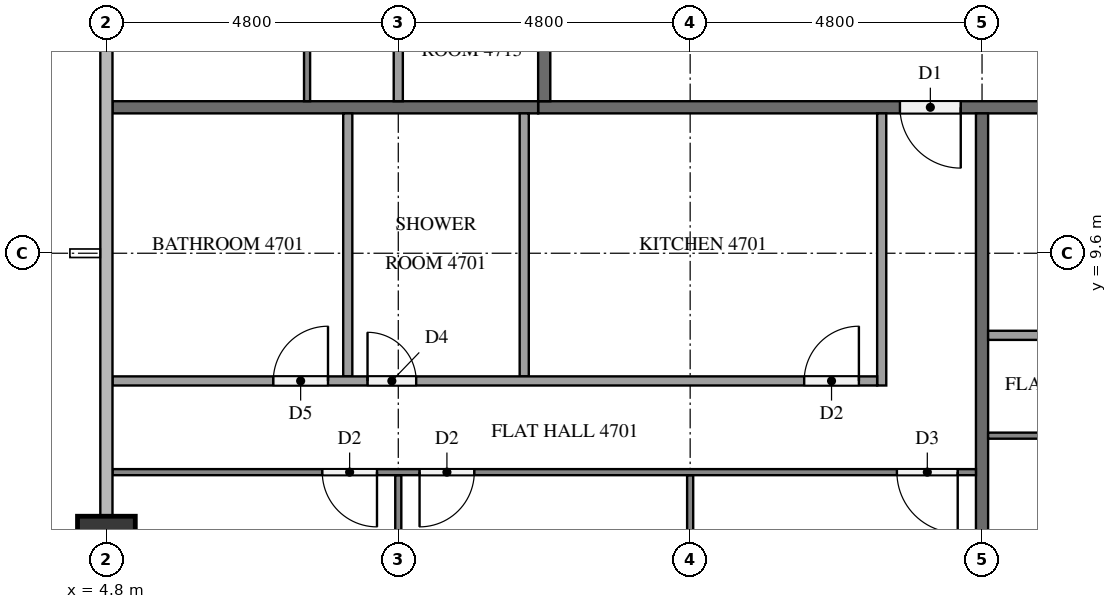
"""IFC4 building model, lengths in metres.
Left out: names, types, materials, properties, quantities, classifications, styles, units other than length and angle.
Written with IfcOpenShell. Run it as: python <this file> out.ifc"""

import sys

from ifc_helpers import new_model, si_unit, direction, frame, frame_2d, origin, origin_2d, place, context, subcontext, project, spatial, rectangle, extrude, element, fill, save


model = new_model("IFC4")
c1 = context("Model", 3, precision=1e-05, world=origin(), true_north=direction((0.0, 1.0)))
c2 = subcontext(c1, "Body", "Model", "MODEL_VIEW")
j1 = project(units=[si_unit("LENGTHUNIT", "METRE"), si_unit("PLANEANGLEUNIT", "RADIAN")], contexts=[c1])
p1 = place(None, origin())
s1 = spatial("IfcSite", under=j1, at=p1, CompositionType="ELEMENT")
p2 = place(p1, origin())
s2 = spatial("IfcBuilding", under=s1, at=p2, CompositionType="ELEMENT")
p3 = place(p2, frame((0.0, 0.0, 182.4)))
s3 = spatial("IfcBuildingStorey", under=s2, at=p3, CompositionType="ELEMENT", Elevation=182.4)
p4 = place(p3, frame((4.8, 4.8, 0.0), z_axis=(0.0, 0.0, 1.0), x_axis=(1.0, 0.0, 0.0)))
e1 = element("IfcColumn", 1, at=p4, inside=s3, PredefinedType="COLUMN", context=c2, shape_type="SweptSolid", body=[
    extrude(rectangle(XDim=0.95, YDim=0.95, at=origin_2d()), origin(), (0.0, 0.0, 1.0), 3.2),
])
p5 = place(p3, frame((50.5, 12.0, 0.0), z_axis=(0.0, 0.0, 1.0), x_axis=(-1.0, 0.0, 0.0)))
e2 = element("IfcWall", 2, at=p5, inside=s3, PredefinedType="PARTITIONING", context=c2, shape_type="SweptSolid", body=[
    extrude(rectangle(XDim=38.6, YDim=0.2, at=frame_2d((19.3, 0.0))), origin(), (0.0, 0.0, 1.0), 3.2),
])
p6 = place(p5, frame((31.65, 0.0, 0.0)))
e3 = element("IfcOpeningElement", 3, at=p6, cuts=e2, PredefinedType="OPENING", context=c2, shape_type="SweptSolid", body=[
    extrude(rectangle(XDim=1.0, YDim=2.1, at=frame_2d((0.5, 1.05))), frame((0.0, 0.11, 0.0), z_axis=(0.0, -1.0, 0.0), x_axis=(1.0, 0.0, 0.0)), (0.0, 0.0, 1.0), 0.22),
])
p7 = place(p5, frame((17.25, 0.0, 0.0)))
e4 = element("IfcOpeningElement", 4, at=p7, cuts=e2, PredefinedType="OPENING", context=c2, shape_type="SweptSolid", body=[
    extrude(rectangle(XDim=1.0, YDim=2.1, at=frame_2d((0.5, 1.05))), frame((0.0, 0.11, 0.0), z_axis=(0.0, -1.0, 0.0), x_axis=(1.0, 0.0, 0.0)), (0.0, 0.0, 1.0), 0.22),
])
p8 = place(p5, frame((7.65, 0.0, 0.0)))
e5 = element("IfcOpeningElement", 5, at=p8, cuts=e2, PredefinedType="OPENING", context=c2, shape_type="SweptSolid", body=[
    extrude(rectangle(XDim=1.0, YDim=2.1, at=frame_2d((0.5, 1.05))), frame((0.0, 0.11, 0.0), z_axis=(0.0, -1.0, 0.0), x_axis=(1.0, 0.0, 0.0)), (0.0, 0.0, 1.0), 0.22),
])
p9 = place(p5, frame((5.9, 0.0, 0.0)))
e6 = element("IfcOpeningElement", 6, at=p9, cuts=e2, PredefinedType="OPENING", context=c2, shape_type="SweptSolid", body=[
    extrude(rectangle(XDim=1.1, YDim=2.1, at=frame_2d((0.55, 1.05))), frame((0.0, 0.11, 0.0), z_axis=(0.0, -1.0, 0.0), x_axis=(1.0, 0.0, 0.0)), (0.0, 0.0, 1.0), 0.22),
])
p10 = place(p3, frame((12.0, 12.1, 0.0), z_axis=(0.0, 0.0, 1.0), x_axis=(0.0, 1.0, 0.0)))
e7 = element("IfcWall", 7, at=p10, inside=s3, PredefinedType="PARTITIONING", context=c2, shape_type="SweptSolid", body=[
    extrude(rectangle(XDim=28.6, YDim=0.2, at=frame_2d((14.3, 0.0))), origin(), (0.0, 0.0, 1.0), 3.2),
])
p11 = place(p10, frame((26.65, 0.0, 0.0)))
e8 = element("IfcOpeningElement", 8, at=p11, cuts=e7, PredefinedType="OPENING", context=c2, shape_type="SweptSolid", body=[
    extrude(rectangle(XDim=1.0, YDim=2.1, at=frame_2d((0.5, 1.05))), frame((0.0, 0.11, 0.0), z_axis=(0.0, -1.0, 0.0), x_axis=(1.0, 0.0, 0.0)), (0.0, 0.0, 1.0), 0.22),
])
p12 = place(p10, frame((24.95, 0.0, 0.0)))
e9 = element("IfcOpeningElement", 9, at=p12, cuts=e7, PredefinedType="OPENING", context=c2, shape_type="SweptSolid", body=[
    extrude(rectangle(XDim=1.0, YDim=2.1, at=frame_2d((0.5, 1.05))), frame((0.0, 0.11, 0.0), z_axis=(0.0, -1.0, 0.0), x_axis=(1.0, 0.0, 0.0)), (0.0, 0.0, 1.0), 0.22),
])
p13 = place(p10, frame((12.95, 0.0, 0.0)))
e10 = element("IfcOpeningElement", 10, at=p13, cuts=e7, PredefinedType="OPENING", context=c2, shape_type="SweptSolid", body=[
    extrude(rectangle(XDim=1.0, YDim=2.1, at=frame_2d((0.5, 1.05))), frame((0.0, 0.11, 0.0), z_axis=(0.0, -1.0, 0.0), x_axis=(1.0, 0.0, 0.0)), (0.0, 0.0, 1.0), 0.22),
])
p14 = place(p3, frame((19.2, 11.9, 0.0), z_axis=(0.0, 0.0, 1.0), x_axis=(0.0, -1.0, 0.0)))
e11 = element("IfcWall", 11, at=p14, inside=s3, PredefinedType="PARTITIONING", context=c2, shape_type="SweptSolid", body=[
    extrude(rectangle(XDim=11.575, YDim=0.2, at=frame_2d((5.788, 0.0))), origin(), (0.0, 0.0, 1.0), 3.2),
])
p15 = place(p3, frame((4.9, 12.0, 0.0), z_axis=(0.0, 0.0, 1.0), x_axis=(1.0, 0.0, 0.0)))
e12 = element("IfcWall", 12, at=p15, inside=s3, PredefinedType="PARTITIONING", context=c2, shape_type="SweptSolid", body=[
    extrude(rectangle(XDim=7.0, YDim=0.2, at=frame_2d((3.5, 0.0))), origin(), (0.0, 0.0, 1.0), 3.2),
])
p16 = place(p3, frame((14.4, 5.95, 0.0), z_axis=(0.0, 0.0, 1.0), x_axis=(0.0, -1.0, 0.0)))
e13 = element("IfcWall", 13, at=p16, inside=s3, PredefinedType="PARTITIONING", context=c2, shape_type="SweptSolid", body=[
    extrude(rectangle(XDim=5.85, YDim=0.1, at=frame_2d((2.925, 0.0))), origin(), (0.0, 0.0, 1.0), 3.2),
])
p17 = place(p3, frame((9.6, 5.95, 0.0), z_axis=(0.0, 0.0, 1.0), x_axis=(0.0, -1.0, 0.0)))
e14 = element("IfcWall", 14, at=p17, inside=s3, PredefinedType="PARTITIONING", context=c2, shape_type="SweptSolid", body=[
    extrude(rectangle(XDim=5.475, YDim=0.1, at=frame_2d((2.737, 0.0))), origin(), (0.0, 0.0, 1.0), 3.2),
])
p18 = place(p3, frame((19.1, 6.0, 0.0), z_axis=(0.0, 0.0, 1.0), x_axis=(-1.0, 0.0, 0.0)))
e15 = element("IfcWall", 15, at=p18, inside=s3, PredefinedType="PARTITIONING", context=c2, shape_type="SweptSolid", body=[
    extrude(rectangle(XDim=14.2, YDim=0.1, at=frame_2d((7.1, 0.0))), origin(), (0.0, 0.0, 1.0), 3.2),
])
p19 = place(p18, frame((0.3, 0.0, 0.0)))
e16 = element("IfcOpeningElement", 16, at=p19, cuts=e15, PredefinedType="OPENING", context=c2, shape_type="SweptSolid", body=[
    extrude(rectangle(XDim=1.0, YDim=2.1, at=frame_2d((0.5, 1.05))), frame((0.0, 0.06, 0.0), z_axis=(0.0, -1.0, 0.0), x_axis=(1.0, 0.0, 0.0)), (0.0, 0.0, 1.0), 0.12),
])
p20 = place(p18, frame((8.25, 0.0, 0.0)))
e17 = element("IfcOpeningElement", 17, at=p20, cuts=e15, PredefinedType="OPENING", context=c2, shape_type="SweptSolid", body=[
    extrude(rectangle(XDim=0.9, YDim=2.1, at=frame_2d((0.45, 1.05))), frame((0.0, 0.06, 0.0), z_axis=(0.0, -1.0, 0.0), x_axis=(1.0, 0.0, 0.0)), (0.0, 0.0, 1.0), 0.12),
])
p21 = place(p18, frame((9.85, 0.0, 0.0)))
e18 = element("IfcOpeningElement", 18, at=p21, cuts=e15, PredefinedType="OPENING", context=c2, shape_type="SweptSolid", body=[
    extrude(rectangle(XDim=0.9, YDim=2.1, at=frame_2d((0.45, 1.05))), frame((0.0, 0.06, 0.0), z_axis=(0.0, -1.0, 0.0), x_axis=(1.0, 0.0, 0.0)), (0.0, 0.0, 1.0), 0.12),
])
for number, where, z_axis, x_axis in (
    (19, (11.671, 11.9, 0.0), (0.0, 0.0, 1.0), (0.0, -1.0, 0.0)),
    (20, (8.769, 11.9, 0.0), (0.0, 0.0, 1.0), (0.0, -1.0, 0.0)),
):
    element("IfcWall", number, at=place(p3, frame(where, z_axis=z_axis, x_axis=x_axis)), inside=s3, PredefinedType="PARTITIONING", context=c2, shape_type="SweptSolid", body=[
        extrude(rectangle(XDim=4.325, YDim=0.15, at=frame_2d((2.163, 0.0))), origin(), (0.0, 0.0, 1.0), 3.2),
    ])
p22 = place(p3, frame((17.55, 11.9, 0.0), z_axis=(0.0, 0.0, 1.0), x_axis=(0.0, -1.0, 0.0)))
e21 = element("IfcWall", 21, at=p22, inside=s3, PredefinedType="PARTITIONING", context=c2, shape_type="SweptSolid", body=[
    extrude(rectangle(XDim=4.475, YDim=0.15, at=frame_2d((2.237, 0.0))), origin(), (0.0, 0.0, 1.0), 3.2),
])
p23 = place(p3, frame((4.9, 7.5, 0.0), z_axis=(0.0, 0.0, 1.0), x_axis=(1.0, 0.0, 0.0)))
e22 = element("IfcWall", 22, at=p23, inside=s3, PredefinedType="PARTITIONING", context=c2, shape_type="SweptSolid", body=[
    extrude(rectangle(XDim=12.575, YDim=0.15, at=frame_2d((6.288, 0.0))), origin(), (0.0, 0.0, 1.0), 3.2),
])
p24 = place(p23, frame((11.375, 0.0, 0.0)))
e23 = element("IfcOpeningElement", 23, at=p24, cuts=e22, PredefinedType="OPENING", context=c2, shape_type="SweptSolid", body=[
    extrude(rectangle(XDim=0.9, YDim=2.1, at=frame_2d((0.45, 1.05))), frame((0.0, 0.085, 0.0), z_axis=(0.0, -1.0, 0.0), x_axis=(1.0, 0.0, 0.0)), (0.0, 0.0, 1.0), 0.17),
])
p25 = place(p23, frame((4.194, 0.0, 0.0)))
e24 = element("IfcOpeningElement", 24, at=p25, cuts=e22, PredefinedType="OPENING", context=c2, shape_type="SweptSolid", body=[
    extrude(rectangle(XDim=0.8, YDim=2.1, at=frame_2d((0.4, 1.05))), frame((0.0, 0.085, 0.0), z_axis=(0.0, -1.0, 0.0), x_axis=(1.0, 0.0, 0.0)), (0.0, 0.0, 1.0), 0.17),
])
p26 = place(p23, frame((2.644, 0.0, 0.0)))
e25 = element("IfcOpeningElement", 25, at=p26, cuts=e22, PredefinedType="OPENING", context=c2, shape_type="SweptSolid", body=[
    extrude(rectangle(XDim=0.9, YDim=2.1, at=frame_2d((0.45, 1.05))), frame((0.0, 0.085, 0.0), z_axis=(0.0, -1.0, 0.0), x_axis=(1.0, 0.0, 0.0)), (0.0, 0.0, 1.0), 0.17),
])
p27 = place(p3, frame((33.5, 6.6, 0.0), z_axis=(0.0, 0.0, 1.0), x_axis=(-1.0, 0.0, 0.0)))
e26 = element("IfcWall", 26, at=p27, inside=s3, PredefinedType="PARTITIONING", context=c2, shape_type="SweptSolid", body=[
    extrude(rectangle(XDim=14.2, YDim=0.1, at=frame_2d((7.1, 0.0))), origin(), (0.0, 0.0, 1.0), 3.2),
])
p28 = place(p27, frame((0.3, 0.0, 0.0)))
e27 = element("IfcOpeningElement", 27, at=p28, cuts=e26, PredefinedType="OPENING", context=c2, shape_type="SweptSolid", body=[
    extrude(rectangle(XDim=0.9, YDim=2.1, at=frame_2d((0.45, 1.05))), frame((0.0, 0.06, 0.0), z_axis=(0.0, -1.0, 0.0), x_axis=(1.0, 0.0, 0.0)), (0.0, 0.0, 1.0), 0.12),
])
p29 = place(p27, frame((8.15, 0.0, 0.0)))
e28 = element("IfcOpeningElement", 28, at=p29, cuts=e26, PredefinedType="OPENING", context=c2, shape_type="SweptSolid", body=[
    extrude(rectangle(XDim=1.0, YDim=2.1, at=frame_2d((0.5, 1.05))), frame((0.0, 0.06, 0.0), z_axis=(0.0, -1.0, 0.0), x_axis=(1.0, 0.0, 0.0)), (0.0, 0.0, 1.0), 0.12),
])
p30 = place(p27, frame((9.85, 0.0, 0.0)))
e29 = element("IfcOpeningElement", 29, at=p30, cuts=e26, PredefinedType="OPENING", context=c2, shape_type="SweptSolid", body=[
    extrude(rectangle(XDim=0.9, YDim=2.1, at=frame_2d((0.45, 1.05))), frame((0.0, 0.06, 0.0), z_axis=(0.0, -1.0, 0.0), x_axis=(1.0, 0.0, 0.0)), (0.0, 0.0, 1.0), 0.12),
])
p31 = place(p3, frame((19.3, 8.25, 0.0), z_axis=(0.0, 0.0, 1.0), x_axis=(1.0, 0.0, 0.0)))
e30 = element("IfcWall", 30, at=p31, inside=s3, PredefinedType="PARTITIONING", context=c2, shape_type="SweptSolid", body=[
    extrude(rectangle(XDim=12.575, YDim=0.15, at=frame_2d((6.288, 0.0))), origin(), (0.0, 0.0, 1.0), 3.2),
])
p32 = place(p31, frame((11.475, 0.0, 0.0)))
e31 = element("IfcOpeningElement", 31, at=p32, cuts=e30, PredefinedType="OPENING", context=c2, shape_type="SweptSolid", body=[
    extrude(rectangle(XDim=0.8, YDim=2.1, at=frame_2d((0.4, 1.05))), frame((0.0, 0.085, 0.0), z_axis=(0.0, -1.0, 0.0), x_axis=(1.0, 0.0, 0.0)), (0.0, 0.0, 1.0), 0.17),
])
p33 = place(p31, frame((6.129, 0.0, 0.0)))
e32 = element("IfcOpeningElement", 32, at=p33, cuts=e30, PredefinedType="OPENING", context=c2, shape_type="SweptSolid", body=[
    extrude(rectangle(XDim=0.9, YDim=2.1, at=frame_2d((0.45, 1.05))), frame((0.0, 0.085, 0.0), z_axis=(0.0, -1.0, 0.0), x_axis=(1.0, 0.0, 0.0)), (0.0, 0.0, 1.0), 0.17),
])
p34 = place(p31, frame((4.579, 0.0, 0.0)))
e33 = element("IfcOpeningElement", 33, at=p34, cuts=e30, PredefinedType="OPENING", context=c2, shape_type="SweptSolid", body=[
    extrude(rectangle(XDim=0.9, YDim=2.1, at=frame_2d((0.45, 1.05))), frame((0.0, 0.085, 0.0), z_axis=(0.0, -1.0, 0.0), x_axis=(1.0, 0.0, 0.0)), (0.0, 0.0, 1.0), 0.17),
])
p35 = place(p3, frame((8.1, 12.1, 0.0), z_axis=(0.0, 0.0, 1.0), x_axis=(0.0, 1.0, 0.0)))
e34 = element("IfcWall", 34, at=p35, inside=s3, PredefinedType="PARTITIONING", context=c2, shape_type="SweptSolid", body=[
    extrude(rectangle(XDim=14.2, YDim=0.1, at=frame_2d((7.1, 0.0))), origin(), (0.0, 0.0, 1.0), 3.2),
])
p36 = place(p35, frame((13.0, 0.0, 0.0)))
e35 = element("IfcOpeningElement", 35, at=p36, cuts=e34, PredefinedType="OPENING", context=c2, shape_type="SweptSolid", body=[
    extrude(rectangle(XDim=0.9, YDim=2.1, at=frame_2d((0.45, 1.05))), frame((0.0, 0.06, 0.0), z_axis=(0.0, -1.0, 0.0), x_axis=(1.0, 0.0, 0.0)), (0.0, 0.0, 1.0), 0.12),
])
p37 = place(p35, frame((5.05, 0.0, 0.0)))
e36 = element("IfcOpeningElement", 36, at=p37, cuts=e34, PredefinedType="OPENING", context=c2, shape_type="SweptSolid", body=[
    extrude(rectangle(XDim=1.0, YDim=2.1, at=frame_2d((0.5, 1.05))), frame((0.0, 0.06, 0.0), z_axis=(0.0, -1.0, 0.0), x_axis=(1.0, 0.0, 0.0)), (0.0, 0.0, 1.0), 0.12),
])
p38 = place(p35, frame((3.45, 0.0, 0.0)))
e37 = element("IfcOpeningElement", 37, at=p38, cuts=e34, PredefinedType="OPENING", context=c2, shape_type="SweptSolid", body=[
    extrude(rectangle(XDim=0.9, YDim=2.1, at=frame_2d((0.45, 1.05))), frame((0.0, 0.06, 0.0), z_axis=(0.0, -1.0, 0.0), x_axis=(1.0, 0.0, 0.0)), (0.0, 0.0, 1.0), 0.12),
])
p39 = place(p3, frame((9.6, 24.675, 0.0), z_axis=(0.0, 0.0, 1.0), x_axis=(0.0, -1.0, 0.0)))
e38 = element("IfcWall", 38, at=p39, inside=s3, PredefinedType="PARTITIONING", context=c2, shape_type="SweptSolid", body=[
    extrude(rectangle(XDim=12.575, YDim=0.15, at=frame_2d((6.288, 0.0))), origin(), (0.0, 0.0, 1.0), 3.2),
])
p40 = place(p39, frame((0.3, 0.0, 0.0)))
e39 = element("IfcOpeningElement", 39, at=p40, cuts=e38, PredefinedType="OPENING", context=c2, shape_type="SweptSolid", body=[
    extrude(rectangle(XDim=0.9, YDim=2.1, at=frame_2d((0.45, 1.05))), frame((0.0, 0.085, 0.0), z_axis=(0.0, -1.0, 0.0), x_axis=(1.0, 0.0, 0.0)), (0.0, 0.0, 1.0), 0.17),
])
p41 = place(p39, frame((8.448, 0.0, 0.0)))
e40 = element("IfcOpeningElement", 40, at=p41, cuts=e38, PredefinedType="OPENING", context=c2, shape_type="SweptSolid", body=[
    extrude(rectangle(XDim=0.9, YDim=2.1, at=frame_2d((0.45, 1.05))), frame((0.0, 0.085, 0.0), z_axis=(0.0, -1.0, 0.0), x_axis=(1.0, 0.0, 0.0)), (0.0, 0.0, 1.0), 0.17),
])
p42 = place(p39, frame((9.998, 0.0, 0.0)))
e41 = element("IfcOpeningElement", 41, at=p42, cuts=e38, PredefinedType="OPENING", context=c2, shape_type="SweptSolid", body=[
    extrude(rectangle(XDim=0.8, YDim=2.1, at=frame_2d((0.4, 1.05))), frame((0.0, 0.085, 0.0), z_axis=(0.0, -1.0, 0.0), x_axis=(1.0, 0.0, 0.0)), (0.0, 0.0, 1.0), 0.17),
])
p43 = place(p6, origin())
e42 = element("IfcDoor", 42, at=p43, inside=s3, OperationType="SINGLE_SWING_LEFT", PredefinedType="DOOR", context=c2, shape_type="SweptSolid", body=[
    extrude(rectangle(XDim=1.0, YDim=2.1, at=frame_2d((0.5, 1.05))), frame((0.0, 0.025, 0.0), z_axis=(0.0, -1.0, 0.0), x_axis=(1.0, 0.0, 0.0)), (0.0, 0.0, 1.0), 0.05),
])
fill(e3, e42)
p44 = place(p19, origin())
e43 = element("IfcDoor", 43, at=p44, inside=s3, OperationType="SINGLE_SWING_LEFT", PredefinedType="DOOR", context=c2, shape_type="SweptSolid", body=[
    extrude(rectangle(XDim=1.0, YDim=2.1, at=frame_2d((0.5, 1.05))), frame((0.0, 0.025, 0.0), z_axis=(0.0, -1.0, 0.0), x_axis=(1.0, 0.0, 0.0)), (0.0, 0.0, 1.0), 0.05),
])
fill(e16, e43)
p45 = place(p20, origin())
e44 = element("IfcDoor", 44, at=p45, inside=s3, OperationType="SINGLE_SWING_RIGHT", PredefinedType="DOOR", context=c2, shape_type="SweptSolid", body=[
    extrude(rectangle(XDim=0.9, YDim=2.1, at=frame_2d((0.45, 1.05))), frame((0.0, 0.025, 0.0), z_axis=(0.0, -1.0, 0.0), x_axis=(1.0, 0.0, 0.0)), (0.0, 0.0, 1.0), 0.05),
])
fill(e17, e44)
p46 = place(p21, origin())
e45 = element("IfcDoor", 45, at=p46, inside=s3, OperationType="SINGLE_SWING_LEFT", PredefinedType="DOOR", context=c2, shape_type="SweptSolid", body=[
    extrude(rectangle(XDim=0.9, YDim=2.1, at=frame_2d((0.45, 1.05))), frame((0.0, 0.025, 0.0), z_axis=(0.0, -1.0, 0.0), x_axis=(1.0, 0.0, 0.0)), (0.0, 0.0, 1.0), 0.05),
])
fill(e18, e45)
p47 = place(p24, origin())
e46 = element("IfcDoor", 46, at=p47, inside=s3, OperationType="SINGLE_SWING_RIGHT", PredefinedType="DOOR", context=c2, shape_type="SweptSolid", body=[
    extrude(rectangle(XDim=0.9, YDim=2.1, at=frame_2d((0.45, 1.05))), frame((0.0, 0.025, 0.0), z_axis=(0.0, -1.0, 0.0), x_axis=(1.0, 0.0, 0.0)), (0.0, 0.0, 1.0), 0.05),
])
fill(e23, e46)
p48 = place(p25, origin())
e47 = element("IfcDoor", 47, at=p48, inside=s3, OperationType="SINGLE_SWING_LEFT", PredefinedType="DOOR", context=c2, shape_type="SweptSolid", body=[
    extrude(rectangle(XDim=0.8, YDim=2.1, at=frame_2d((0.4, 1.05))), frame((0.0, 0.025, 0.0), z_axis=(0.0, -1.0, 0.0), x_axis=(1.0, 0.0, 0.0)), (0.0, 0.0, 1.0), 0.05),
])
fill(e24, e47)
p49 = place(p26, origin())
e48 = element("IfcDoor", 48, at=p49, inside=s3, OperationType="SINGLE_SWING_RIGHT", PredefinedType="DOOR", context=c2, shape_type="SweptSolid", body=[
    extrude(rectangle(XDim=0.9, YDim=2.1, at=frame_2d((0.45, 1.05))), frame((0.0, 0.025, 0.0), z_axis=(0.0, -1.0, 0.0), x_axis=(1.0, 0.0, 0.0)), (0.0, 0.0, 1.0), 0.05),
])
fill(e25, e48)
save(model, sys.argv[1])
